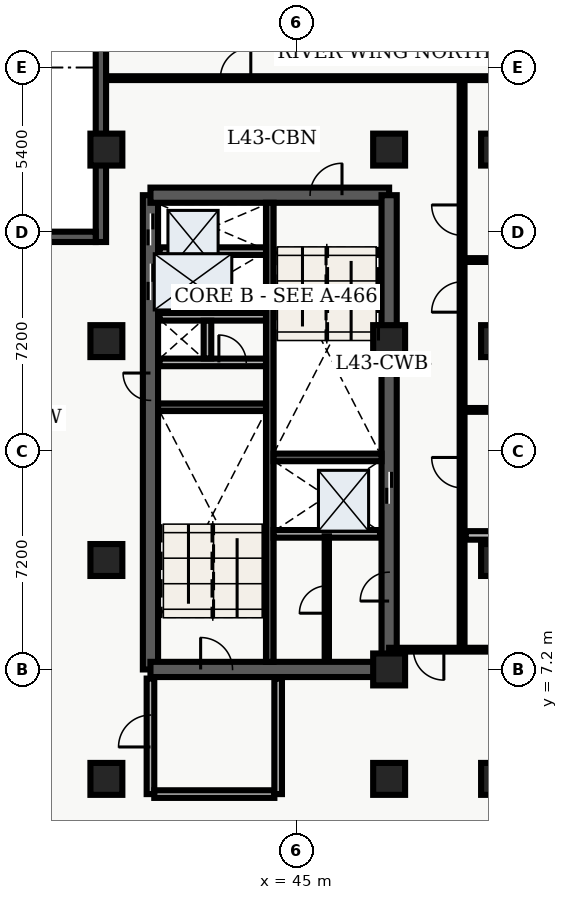
"""IFC4 building model, lengths in metres.
Left out: names, types, materials, properties, quantities, classifications, styles, units other than length and angle.
Written with IfcOpenShell. Run it as: python <this file> out.ifc"""

import sys

from ifc_helpers import new_model, entity, si_unit, converted_unit, direction, frame, origin_with_axes, origin_2d_with_axis, place, context, subcontext, project, spatial, polyline, rectangle, outline, extrude, element, fill, save


model = new_model("IFC4")
c1 = context("Model", 3, precision=1e-05, world=origin_with_axes(), true_north=direction((0.0, 1.0)))
c2 = subcontext(c1, "Body", "Model", "MODEL_VIEW")
j1 = project(units=[si_unit("LENGTHUNIT", "METRE"), converted_unit("PLANEANGLEUNIT", "DEGREE", entity("IfcPlaneAngleMeasure", 0.017), si_unit("PLANEANGLEUNIT", "RADIAN"), dimensions=[0, 0, 0, 0, 0, 0, 0])], contexts=[c1])
p1 = place(None, origin_with_axes())
s1 = spatial("IfcSite", under=j1, at=p1, CompositionType="ELEMENT")
p2 = place(p1, origin_with_axes())
s2 = spatial("IfcBuilding", under=s1, at=p2, CompositionType="ELEMENT")
p3 = place(p2, frame((0.0, 0.0, 175.8), z_axis=(0.0, 0.0, 1.0), x_axis=(1.0, 0.0, 0.0)))
s3 = spatial("IfcBuildingStorey", under=s2, at=p3, CompositionType="ELEMENT", Elevation=175.8)
p4 = place(p3, frame((40.2, 7.2, 0.0), z_axis=(0.0, 0.0, 1.0), x_axis=(0.0, 1.0, 0.0)))
e1 = element("IfcWall", 1, at=p4, inside=s3, PredefinedType="SHEAR", context=c2, shape_type="SweptSolid", body=[
    extrude(outline(polyline([(0.0, -0.25), (15.6, -0.25), (15.6, 0.25), (0.0, 0.25), (0.0, -0.25)])), origin_with_axes(), (0.0, 0.0, 1.0), 3.66),
])
p5 = place(p4, frame((14.475, 0.0, 0.0), z_axis=(0.0, 0.0, 1.0), x_axis=(1.0, 0.0, 0.0)))
e2 = element("IfcOpeningElement", 2, at=p5, cuts=e1, PredefinedType="OPENING", context=c2, shape_type="SweptSolid", body=[
    extrude(rectangle(XDim=1.05, YDim=0.52, at=origin_2d_with_axis()), origin_with_axes(), (0.0, 0.0, 1.0), 2.15),
])
p6 = place(p4, frame((12.75, 0.0, 0.0), z_axis=(0.0, 0.0, 1.0), x_axis=(1.0, 0.0, 0.0)))
e3 = element("IfcOpeningElement", 3, at=p6, cuts=e1, PredefinedType="OPENING", context=c2, shape_type="SweptSolid", body=[
    extrude(rectangle(XDim=1.2, YDim=0.52, at=origin_2d_with_axis()), origin_with_axes(), (0.0, 0.0, 1.0), 2.15),
])
p7 = place(p4, frame((9.3, 0.0, 0.0), z_axis=(0.0, 0.0, 1.0), x_axis=(1.0, 0.0, 0.0)))
e4 = element("IfcOpeningElement", 4, at=p7, cuts=e1, PredefinedType="OPENING", context=c2, shape_type="SweptSolid", body=[
    extrude(rectangle(XDim=0.9, YDim=0.52, at=origin_2d_with_axis()), origin_with_axes(), (0.0, 0.0, 1.0), 2.15),
])
p8 = place(p3, frame((40.2, 7.2, 0.0), z_axis=(0.0, 0.0, 1.0), x_axis=(1.0, 0.0, 0.0)))
e5 = element("IfcWall", 5, at=p8, inside=s3, PredefinedType="SHEAR", context=c2, shape_type="SweptSolid", body=[
    extrude(outline(polyline([(0.0, -0.25), (7.85, -0.25), (7.85, 0.25), (0.0, 0.25), (0.0, -0.25)])), origin_with_axes(), (0.0, 0.0, 1.0), 3.66),
])
p9 = place(p8, frame((2.175, 0.0, 0.0), z_axis=(0.0, 0.0, 1.0), x_axis=(1.0, 0.0, 0.0)))
e6 = element("IfcOpeningElement", 6, at=p9, cuts=e5, PredefinedType="OPENING", context=c2, shape_type="SweptSolid", body=[
    extrude(rectangle(XDim=1.05, YDim=0.52, at=origin_2d_with_axis()), origin_with_axes(), (0.0, 0.0, 1.0), 2.15),
])
p10 = place(p3, frame((40.2, 22.8, 0.0), z_axis=(0.0, 0.0, 1.0), x_axis=(1.0, 0.0, 0.0)))
e7 = element("IfcWall", 7, at=p10, inside=s3, PredefinedType="SHEAR", context=c2, shape_type="SweptSolid", body=[
    extrude(outline(polyline([(0.0, -0.25), (7.85, -0.25), (7.85, 0.25), (0.0, 0.25), (0.0, -0.25)])), origin_with_axes(), (0.0, 0.0, 1.0), 3.66),
])
p11 = place(p10, frame((5.775, 0.0, 0.0), z_axis=(0.0, 0.0, 1.0), x_axis=(1.0, 0.0, 0.0)))
e8 = element("IfcOpeningElement", 8, at=p11, cuts=e7, PredefinedType="OPENING", context=c2, shape_type="SweptSolid", body=[
    extrude(rectangle(XDim=1.05, YDim=0.52, at=origin_2d_with_axis()), origin_with_axes(), (0.0, 0.0, 1.0), 2.15),
])
p12 = place(p3, frame((48.05, 7.2, 0.0), z_axis=(0.0, 0.0, 1.0), x_axis=(0.0, 1.0, 0.0)))
e9 = element("IfcWall", 9, at=p12, inside=s3, PredefinedType="SHEAR", context=c2, shape_type="SweptSolid", body=[
    extrude(outline(polyline([(0.0, -0.25), (15.6, -0.25), (15.6, 0.25), (0.0, 0.25), (0.0, -0.25)])), origin_with_axes(), (0.0, 0.0, 1.0), 3.66),
])
p13 = place(p12, frame((5.975, 0.0, 0.0), z_axis=(0.0, 0.0, 1.0), x_axis=(1.0, 0.0, 0.0)))
e10 = element("IfcOpeningElement", 10, at=p13, cuts=e9, PredefinedType="OPENING", context=c2, shape_type="SweptSolid", body=[
    extrude(rectangle(XDim=1.05, YDim=0.52, at=origin_2d_with_axis()), origin_with_axes(), (0.0, 0.0, 1.0), 2.15),
])
p14 = place(p12, frame((2.725, 0.0, 0.0), z_axis=(0.0, 0.0, 1.0), x_axis=(1.0, 0.0, 0.0)))
e11 = element("IfcOpeningElement", 11, at=p14, cuts=e9, PredefinedType="OPENING", context=c2, shape_type="SweptSolid", body=[
    extrude(rectangle(XDim=0.95, YDim=0.52, at=origin_2d_with_axis()), origin_with_axes(), (0.0, 0.0, 1.0), 2.15),
])
p15 = place(p3, frame((44.125, 7.45, 0.0), z_axis=(0.0, 0.0, 1.0), x_axis=(0.0, 1.0, 0.0)))
e12 = element("IfcWall", 12, at=p15, inside=s3, PredefinedType="SHEAR", context=c2, shape_type="SweptSolid", body=[
    extrude(outline(polyline([(0.0, -0.125), (15.1, -0.125), (15.1, 0.125), (0.0, 0.125), (0.0, -0.125)])), origin_with_axes(), (0.0, 0.0, 1.0), 3.66),
])
for number, where, z_axis, x_axis in (
    (13, (40.45, 15.825, 0.0), (0.0, 0.0, 1.0), (1.0, 0.0, 0.0)),
    (14, (44.25, 14.175, 0.0), (0.0, 0.0, 1.0), (1.0, 0.0, 0.0)),
):
    element("IfcWall", number, at=place(p3, frame(where, z_axis=z_axis, x_axis=x_axis)), inside=s3, PredefinedType="SHEAR", context=c2, shape_type="SweptSolid", body=[
        extrude(outline(polyline([(0.0, -0.125), (3.55, -0.125), (3.55, 0.125), (0.0, 0.125), (0.0, -0.125)])), origin_with_axes(), (0.0, 0.0, 1.0), 3.66),
    ])
p16 = place(p3, frame((40.5, 17.3, 0.0), z_axis=(0.0, 0.0, 1.0), x_axis=(1.0, 0.0, 0.0)))
e15 = element("IfcWall", 15, at=p16, inside=s3, PredefinedType="SOLIDWALL", context=c2, shape_type="SweptSolid", body=[
    extrude(outline(polyline([(0.0, -0.125), (3.5, -0.125), (3.5, 0.125), (0.0, 0.125), (0.0, -0.125)])), origin_with_axes(), (0.0, 0.0, 1.0), 2.7),
])
p17 = place(p16, frame((2.4, 0.0, 0.0), z_axis=(0.0, 0.0, 1.0), x_axis=(1.0, 0.0, 0.0)))
e16 = element("IfcOpeningElement", 16, at=p17, cuts=e15, PredefinedType="OPENING", context=c2, shape_type="SweptSolid", body=[
    extrude(rectangle(XDim=0.9, YDim=0.27, at=origin_2d_with_axis()), origin_with_axes(), (0.0, 0.0, 1.0), 2.15),
])
p18 = place(p3, frame((40.5, 18.8, 0.0), z_axis=(0.0, 0.0, 1.0), x_axis=(1.0, 0.0, 0.0)))
e17 = element("IfcWall", 17, at=p18, inside=s3, PredefinedType="SOLIDWALL", context=c2, shape_type="SweptSolid", body=[
    extrude(outline(polyline([(0.0, -0.125), (3.5, -0.125), (3.5, 0.125), (0.0, 0.125), (0.0, -0.125)])), origin_with_axes(), (0.0, 0.0, 1.0), 2.7),
])
p19 = place(p3, frame((42.075, 17.43, 0.0), z_axis=(0.0, 0.0, 1.0), x_axis=(0.0, 1.0, 0.0)))
e18 = element("IfcWall", 18, at=p19, inside=s3, PredefinedType="SOLIDWALL", context=c2, shape_type="SweptSolid", body=[
    extrude(outline(polyline([(0.0, -0.125), (1.24, -0.125), (1.24, 0.125), (0.0, 0.125), (0.0, -0.125)])), origin_with_axes(), (0.0, 0.0, 1.0), 2.7),
])
p20 = place(p3, frame((40.2, 3.1, 0.0), z_axis=(0.0, 0.0, 1.0), x_axis=(0.0, 1.0, 0.0)))
e19 = element("IfcWall", 19, at=p20, inside=s3, PredefinedType="SOLIDWALL", context=c2, shape_type="SweptSolid", body=[
    extrude(outline(polyline([(0.0, -0.125), (3.8, -0.125), (3.8, 0.125), (0.0, 0.125), (0.0, -0.125)])), origin_with_axes(), (0.0, 0.0, 1.0), 2.7),
])
p21 = place(p20, frame((2.075, 0.0, 0.0), z_axis=(0.0, 0.0, 1.0), x_axis=(1.0, 0.0, 0.0)))
e20 = element("IfcOpeningElement", 20, at=p21, cuts=e19, PredefinedType="OPENING", context=c2, shape_type="SweptSolid", body=[
    extrude(rectangle(XDim=1.05, YDim=0.27, at=origin_2d_with_axis()), origin_with_axes(), (0.0, 0.0, 1.0), 2.15),
])
p22 = place(p3, frame((40.325, 3.1, 0.0), z_axis=(0.0, 0.0, 1.0), x_axis=(1.0, 0.0, 0.0)))
e21 = element("IfcWall", 21, at=p22, inside=s3, PredefinedType="SOLIDWALL", context=c2, shape_type="SweptSolid", body=[
    extrude(outline(polyline([(0.0, -0.125), (3.95, -0.125), (3.95, 0.125), (0.0, 0.125), (0.0, -0.125)])), origin_with_axes(), (0.0, 0.0, 1.0), 2.7),
])
p23 = place(p3, frame((44.4, 3.1, 0.0), z_axis=(0.0, 0.0, 1.0), x_axis=(0.0, 1.0, 0.0)))
e22 = element("IfcWall", 22, at=p23, inside=s3, PredefinedType="SOLIDWALL", context=c2, shape_type="SweptSolid", body=[
    extrude(outline(polyline([(0.0, -0.125), (3.8, -0.125), (3.8, 0.125), (0.0, 0.125), (0.0, -0.125)])), origin_with_axes(), (0.0, 0.0, 1.0), 2.7),
])
for number, where, z_axis, x_axis in (
    (23, (38.75, 3.6, 0.0), (0.0, 0.0, 1.0), (1.0, 0.0, 0.0)),
    (24, (38.75, 10.8, 0.0), (0.0, 0.0, 1.0), (1.0, 0.0, 0.0)),
    (25, (38.75, 18.0, 0.0), (0.0, 0.0, 1.0), (1.0, 0.0, 0.0)),
    (26, (38.75, 24.3, 0.0), (0.0, 0.0, 1.0), (1.0, 0.0, 0.0)),
    (27, (48.05, 3.6, 0.0), (0.0, 0.0, 1.0), (1.0, 0.0, 0.0)),
    (28, (48.05, 7.2, 0.0), (0.0, 0.0, 1.0), (1.0, 0.0, 0.0)),
    (29, (48.05, 18.0, 0.0), (0.0, 0.0, 1.0), (1.0, 0.0, 0.0)),
    (30, (48.05, 24.3, 0.0), (0.0, 0.0, 1.0), (1.0, 0.0, 0.0)),
    (31, (51.6, 3.6, 0.0), (0.0, 0.0, 1.0), (1.0, 0.0, 0.0)),
    (32, (51.6, 10.8, 0.0), (0.0, 0.0, 1.0), (1.0, 0.0, 0.0)),
    (33, (51.6, 18.0, 0.0), (0.0, 0.0, 1.0), (1.0, 0.0, 0.0)),
    (34, (51.6, 24.3, 0.0), (0.0, 0.0, 1.0), (1.0, 0.0, 0.0)),
):
    element("IfcColumn", number, at=place(p3, frame(where, z_axis=z_axis, x_axis=x_axis)), inside=s3, PredefinedType="COLUMN", context=c2, shape_type="SweptSolid", body=[
        extrude(rectangle(XDim=1.05, YDim=1.05, at=origin_2d_with_axis()), origin_with_axes(), (0.0, 0.0, 1.0), 3.9),
    ])
for number, where, z_axis, x_axis in (
    (35, (40.5, 20.96, 0.0), (0.0, 0.0, 1.0), (1.0, 0.0, 0.0)),
    (36, (44.25, 11.66, 0.0), (0.0, 0.0, 1.0), (1.0, 0.0, 0.0)),
):
    element("IfcWall", number, at=place(p3, frame(where, z_axis=z_axis, x_axis=x_axis)), inside=s3, PredefinedType="SOLIDWALL", context=c2, shape_type="SweptSolid", body=[
        extrude(outline(polyline([(0.0, -0.125), (3.5, -0.125), (3.5, 0.125), (0.0, 0.125), (0.0, -0.125)])), origin_with_axes(), (0.0, 0.0, 1.0), 2.7),
    ])
p24 = place(p3, frame((46.0, 7.5, 0.0), z_axis=(0.0, 0.0, 1.0), x_axis=(0.0, 1.0, 0.0)))
e37 = element("IfcWall", 37, at=p24, inside=s3, PredefinedType="PARTITIONING", context=c2, shape_type="SweptSolid", body=[
    extrude(outline(polyline([(0.0, -0.07), (4.08, -0.07), (4.08, 0.07), (0.0, 0.07), (0.0, -0.07)])), origin_with_axes(), (0.0, 0.0, 1.0), 2.7),
])
p25 = place(p24, frame((2.0, 0.0, 0.0), z_axis=(0.0, 0.0, 1.0), x_axis=(1.0, 0.0, 0.0)))
e38 = element("IfcOpeningElement", 38, at=p25, cuts=e37, PredefinedType="OPENING", context=c2, shape_type="SweptSolid", body=[
    extrude(rectangle(XDim=0.9, YDim=0.16, at=origin_2d_with_axis()), origin_with_axes(), (0.0, 0.0, 1.0), 2.15),
])
p26 = place(p3, frame((50.45, 7.85, 0.0), z_axis=(0.0, 0.0, 1.0), x_axis=(0.0, 1.0, 0.0)))
e39 = element("IfcWall", 39, at=p26, inside=s3, PredefinedType="PARTITIONING", context=c2, shape_type="SweptSolid", body=[
    extrude(outline(polyline([(0.0, -0.08), (18.8, -0.08), (18.8, 0.08), (0.0, 0.08), (0.0, -0.08)])), origin_with_axes(), (0.0, 0.0, 1.0), 2.7),
])
p27 = place(p26, frame((5.823, 0.0, 0.0), z_axis=(0.0, 0.0, 1.0), x_axis=(1.0, 0.0, 0.0)))
e40 = element("IfcOpeningElement", 40, at=p27, cuts=e39, PredefinedType="OPENING", context=c2, shape_type="SweptSolid", body=[
    extrude(rectangle(XDim=1.0, YDim=0.18, at=origin_2d_with_axis()), origin_with_axes(), (0.0, 0.0, 1.0), 2.15),
])
p28 = place(p26, frame((11.602, 0.0, 0.0), z_axis=(0.0, 0.0, 1.0), x_axis=(1.0, 0.0, 0.0)))
e41 = element("IfcOpeningElement", 41, at=p28, cuts=e39, PredefinedType="OPENING", context=c2, shape_type="SweptSolid", body=[
    extrude(rectangle(XDim=1.0, YDim=0.18, at=origin_2d_with_axis()), origin_with_axes(), (0.0, 0.0, 1.0), 2.15),
])
p29 = place(p26, frame((14.129, 0.0, 0.0), z_axis=(0.0, 0.0, 1.0), x_axis=(1.0, 0.0, 0.0)))
e42 = element("IfcOpeningElement", 42, at=p29, cuts=e39, PredefinedType="OPENING", context=c2, shape_type="SweptSolid", body=[
    extrude(rectangle(XDim=1.0, YDim=0.18, at=origin_2d_with_axis()), origin_with_axes(), (0.0, 0.0, 1.0), 2.15),
])
p30 = place(p3, frame((59.665, 7.85, 0.0), z_axis=(0.0, 0.0, 1.0), x_axis=(-1.0, 0.0, 0.0)))
e43 = element("IfcWall", 43, at=p30, inside=s3, PredefinedType="PARTITIONING", context=c2, shape_type="SweptSolid", body=[
    extrude(outline(polyline([(0.0, -0.062), (11.615, -0.062), (11.615, 0.062), (0.0, 0.062), (0.0, -0.062)])), origin_with_axes(), (0.0, 0.0, 1.0), 2.7),
])
p31 = place(p30, frame((10.315, 0.0, 0.0), z_axis=(0.0, 0.0, 1.0), x_axis=(1.0, 0.0, 0.0)))
e44 = element("IfcOpeningElement", 44, at=p31, cuts=e43, PredefinedType="OPENING", context=c2, shape_type="SweptSolid", body=[
    extrude(rectangle(XDim=1.0, YDim=0.145, at=origin_2d_with_axis()), origin_with_axes(), (0.0, 0.0, 1.0), 2.15),
])
p32 = place(p3, frame((38.735, 26.65, 0.0), z_axis=(0.0, 0.0, 1.0), x_axis=(1.0, 0.0, 0.0)))
e45 = element("IfcWall", 45, at=p32, inside=s3, PredefinedType="PARTITIONING", context=c2, shape_type="SweptSolid", body=[
    extrude(outline(polyline([(0.0, -0.062), (20.905, -0.062), (20.905, 0.062), (0.0, 0.062), (0.0, -0.062)])), origin_with_axes(), (0.0, 0.0, 1.0), 2.7),
])
p33 = place(p32, frame((4.265, 0.0, 0.0), z_axis=(0.0, 0.0, 1.0), x_axis=(1.0, 0.0, 0.0)))
e46 = element("IfcOpeningElement", 46, at=p33, cuts=e45, PredefinedType="OPENING", context=c2, shape_type="SweptSolid", body=[
    extrude(rectangle(XDim=1.0, YDim=0.145, at=origin_2d_with_axis()), origin_with_axes(), (0.0, 0.0, 1.0), 2.15),
])
p34 = place(p3, frame((50.57, 11.609, 0.0), z_axis=(0.0, 0.0, 1.0), x_axis=(1.0, 0.0, 0.0)))
e47 = element("IfcWall", 47, at=p34, inside=s3, PredefinedType="PARTITIONING", context=c2, shape_type="SweptSolid", body=[
    extrude(outline(polyline([(0.0, -0.14), (9.095, -0.14), (9.095, 0.14), (0.0, 0.14), (0.0, -0.14)])), origin_with_axes(), (0.0, 0.0, 1.0), 2.7),
])
p35 = place(p34, frame((4.525, 0.0, 0.0), z_axis=(0.0, 0.0, 1.0), x_axis=(1.0, 0.0, 0.0)))
e48 = element("IfcOpeningElement", 48, at=p35, cuts=e47, PredefinedType="OPENING", context=c2, shape_type="SweptSolid", body=[
    extrude(rectangle(XDim=0.95, YDim=0.3, at=origin_2d_with_axis()), origin_with_axes(), (0.0, 0.0, 1.0), 2.15),
])
for number, where, z_axis, x_axis in (
    (49, (50.57, 15.737, 0.0), (0.0, 0.0, 1.0), (1.0, 0.0, 0.0)),
    (50, (50.57, 20.667, 0.0), (0.0, 0.0, 1.0), (1.0, 0.0, 0.0)),
):
    element("IfcWall", number, at=place(p3, frame(where, z_axis=z_axis, x_axis=x_axis)), inside=s3, PredefinedType="PARTITIONING", context=c2, shape_type="SweptSolid", body=[
        extrude(outline(polyline([(0.0, -0.062), (9.095, -0.062), (9.095, 0.062), (0.0, 0.062), (0.0, -0.062)])), origin_with_axes(), (0.0, 0.0, 1.0), 2.7),
    ])
p36 = place(p3, frame((38.57, 21.26, 0.0), z_axis=(0.0, 0.0, 1.0), x_axis=(0.0, 1.0, 0.0)))
e51 = element("IfcWall", 51, at=p36, inside=s3, PredefinedType="SOLIDWALL", context=c2, shape_type="SweptSolid", body=[
    extrude(outline(polyline([(0.0, -0.17), (7.54, -0.17), (7.54, 0.17), (0.0, 0.17), (0.0, -0.17)])), origin_with_axes(), (0.0, 0.0, 1.0), 3.66),
])
p37 = place(p3, frame((24.913, 21.43, 0.0), z_axis=(0.0, 0.0, 1.0), x_axis=(1.0, 0.0, 0.0)))
e52 = element("IfcWall", 52, at=p37, inside=s3, PredefinedType="SOLIDWALL", context=c2, shape_type="SweptSolid", body=[
    extrude(outline(polyline([(0.0, -0.17), (13.487, -0.17), (13.487, 0.17), (0.0, 0.17), (0.0, -0.17)])), origin_with_axes(), (0.0, 0.0, 1.0), 3.66),
])
p38 = place(p37, frame((3.672, 0.0, 0.45), z_axis=(0.0, 0.0, 1.0), x_axis=(1.0, 0.0, 0.0)))
e53 = element("IfcOpeningElement", 53, at=p38, cuts=e52, PredefinedType="OPENING", context=c2, shape_type="SweptSolid", body=[
    extrude(rectangle(XDim=1.8, YDim=0.36, at=origin_2d_with_axis()), origin_with_axes(), (0.0, 0.0, 1.0), 2.1),
])
p39 = place(p37, frame((9.815, 0.0, 0.45), z_axis=(0.0, 0.0, 1.0), x_axis=(1.0, 0.0, 0.0)))
e54 = element("IfcOpeningElement", 54, at=p39, cuts=e52, PredefinedType="OPENING", context=c2, shape_type="SweptSolid", body=[
    extrude(rectangle(XDim=1.8, YDim=0.36, at=origin_2d_with_axis()), origin_with_axes(), (0.0, 0.0, 1.0), 2.1),
])
p40 = place(p12, frame((5.975, 0.0, 0.0), z_axis=(0.0, 0.0, 1.0), x_axis=(1.0, 0.0, 0.0)))
e55 = element("IfcDoor", 55, at=p40, inside=s3, OperationType="SLIDING_TO_LEFT", PredefinedType="DOOR", context=c2, shape_type="SweptSolid", body=[
    extrude(rectangle(XDim=1.05, YDim=0.09, at=origin_2d_with_axis()), origin_with_axes(), (0.0, 0.0, 1.0), 2.15),
])
fill(e10, e55)
p41 = place(p4, frame((14.475, 0.0, 0.0), z_axis=(0.0, 0.0, 1.0), x_axis=(1.0, 0.0, 0.0)))
e56 = element("IfcDoor", 56, at=p41, inside=s3, OperationType="SLIDING_TO_RIGHT", PredefinedType="DOOR", context=c2, shape_type="SweptSolid", body=[
    extrude(rectangle(XDim=1.05, YDim=0.09, at=origin_2d_with_axis()), origin_with_axes(), (0.0, 0.0, 1.0), 2.15),
])
fill(e2, e56)
p42 = place(p4, frame((12.75, 0.0, 0.0), z_axis=(0.0, 0.0, 1.0), x_axis=(1.0, 0.0, 0.0)))
e57 = element("IfcDoor", 57, at=p42, inside=s3, OperationType="DOUBLE_DOOR_SLIDING", PredefinedType="DOOR", context=c2, shape_type="SweptSolid", body=[
    extrude(rectangle(XDim=1.2, YDim=0.09, at=origin_2d_with_axis()), origin_with_axes(), (0.0, 0.0, 1.0), 2.15),
])
fill(e3, e57)
p43 = place(p4, frame((9.3, 0.0, 0.0), z_axis=(0.0, 0.0, 1.0), x_axis=(1.0, 0.0, 0.0)))
e58 = element("IfcDoor", 58, at=p43, inside=s3, OperationType="SINGLE_SWING_RIGHT", PredefinedType="DOOR", context=c2, shape_type="SweptSolid", body=[
    extrude(rectangle(XDim=0.9, YDim=0.09, at=origin_2d_with_axis()), origin_with_axes(), (0.0, 0.0, 1.0), 2.15),
])
fill(e4, e58)
p44 = place(p16, frame((2.4, 0.0, 0.0), z_axis=(0.0, 0.0, 1.0), x_axis=(1.0, 0.0, 0.0)))
e59 = element("IfcDoor", 59, at=p44, inside=s3, OperationType="SINGLE_SWING_LEFT", PredefinedType="DOOR", context=c2, shape_type="SweptSolid", body=[
    extrude(rectangle(XDim=0.9, YDim=0.09, at=origin_2d_with_axis()), origin_with_axes(), (0.0, 0.0, 1.0), 2.15),
])
fill(e16, e59)
p45 = place(p8, frame((2.175, 0.0, 0.0), z_axis=(0.0, 0.0, 1.0), x_axis=(1.0, 0.0, 0.0)))
e60 = element("IfcDoor", 60, at=p45, inside=s3, OperationType="SINGLE_SWING_LEFT", PredefinedType="DOOR", context=c2, shape_type="SweptSolid", body=[
    extrude(rectangle(XDim=1.05, YDim=0.09, at=origin_2d_with_axis()), origin_with_axes(), (0.0, 0.0, 1.0), 2.15),
])
fill(e6, e60)
p46 = place(p10, frame((5.775, 0.0, 0.0), z_axis=(0.0, 0.0, 1.0), x_axis=(1.0, 0.0, 0.0)))
e61 = element("IfcDoor", 61, at=p46, inside=s3, OperationType="SINGLE_SWING_RIGHT", PredefinedType="DOOR", context=c2, shape_type="SweptSolid", body=[
    extrude(rectangle(XDim=1.05, YDim=0.09, at=origin_2d_with_axis()), origin_with_axes(), (0.0, 0.0, 1.0), 2.15),
])
fill(e8, e61)
p47 = place(p20, frame((2.075, 0.0, 0.0), z_axis=(0.0, 0.0, 1.0), x_axis=(1.0, 0.0, 0.0)))
e62 = element("IfcDoor", 62, at=p47, inside=s3, OperationType="SINGLE_SWING_LEFT", PredefinedType="DOOR", context=c2, shape_type="SweptSolid", body=[
    extrude(rectangle(XDim=1.05, YDim=0.09, at=origin_2d_with_axis()), origin_with_axes(), (0.0, 0.0, 1.0), 2.15),
])
fill(e20, e62)
p48 = place(p24, frame((2.0, 0.0, 0.0), z_axis=(0.0, 0.0, 1.0), x_axis=(1.0, 0.0, 0.0)))
e63 = element("IfcDoor", 63, at=p48, inside=s3, OperationType="SINGLE_SWING_LEFT", PredefinedType="DOOR", context=c2, shape_type="SweptSolid", body=[
    extrude(rectangle(XDim=0.9, YDim=0.084, at=origin_2d_with_axis()), origin_with_axes(), (0.0, 0.0, 1.0), 2.15),
])
fill(e38, e63)
p49 = place(p12, frame((2.725, 0.0, 0.0), z_axis=(0.0, 0.0, 1.0), x_axis=(1.0, 0.0, 0.0)))
e64 = element("IfcDoor", 64, at=p49, inside=s3, OperationType="SINGLE_SWING_LEFT", PredefinedType="DOOR", context=c2, shape_type="SweptSolid", body=[
    extrude(rectangle(XDim=0.95, YDim=0.09, at=origin_2d_with_axis()), origin_with_axes(), (0.0, 0.0, 1.0), 2.15),
])
fill(e11, e64)
p50 = place(p30, frame((10.315, 0.0, 0.0), z_axis=(0.0, 0.0, 1.0), x_axis=(1.0, 0.0, 0.0)))
e65 = element("IfcDoor", 65, at=p50, inside=s3, OperationType="SINGLE_SWING_LEFT", PredefinedType="DOOR", context=c2, shape_type="SweptSolid", body=[
    extrude(rectangle(XDim=1.0, YDim=0.075, at=origin_2d_with_axis()), origin_with_axes(), (0.0, 0.0, 1.0), 2.15),
])
fill(e44, e65)
p51 = place(p32, frame((4.265, 0.0, 0.0), z_axis=(0.0, 0.0, 1.0), x_axis=(1.0, 0.0, 0.0)))
e66 = element("IfcDoor", 66, at=p51, inside=s3, OperationType="SINGLE_SWING_RIGHT", PredefinedType="DOOR", context=c2, shape_type="SweptSolid", body=[
    extrude(rectangle(XDim=1.0, YDim=0.075, at=origin_2d_with_axis()), origin_with_axes(), (0.0, 0.0, 1.0), 2.15),
])
fill(e46, e66)
p52 = place(p26, frame((5.823, 0.0, 0.0), z_axis=(0.0, 0.0, 1.0), x_axis=(1.0, 0.0, 0.0)))
e67 = element("IfcDoor", 67, at=p52, inside=s3, OperationType="SINGLE_SWING_RIGHT", PredefinedType="DOOR", context=c2, shape_type="SweptSolid", body=[
    extrude(rectangle(XDim=1.0, YDim=0.09, at=origin_2d_with_axis()), origin_with_axes(), (0.0, 0.0, 1.0), 2.15),
])
fill(e40, e67)
p53 = place(p26, frame((11.602, 0.0, 0.0), z_axis=(0.0, 0.0, 1.0), x_axis=(1.0, 0.0, 0.0)))
e68 = element("IfcDoor", 68, at=p53, inside=s3, OperationType="SINGLE_SWING_LEFT", PredefinedType="DOOR", context=c2, shape_type="SweptSolid", body=[
    extrude(rectangle(XDim=1.0, YDim=0.09, at=origin_2d_with_axis()), origin_with_axes(), (0.0, 0.0, 1.0), 2.15),
])
fill(e41, e68)
p54 = place(p26, frame((14.129, 0.0, 0.0), z_axis=(0.0, 0.0, 1.0), x_axis=(1.0, 0.0, 0.0)))
e69 = element("IfcDoor", 69, at=p54, inside=s3, OperationType="SINGLE_SWING_RIGHT", PredefinedType="DOOR", context=c2, shape_type="SweptSolid", body=[
    extrude(rectangle(XDim=1.0, YDim=0.09, at=origin_2d_with_axis()), origin_with_axes(), (0.0, 0.0, 1.0), 2.15),
])
fill(e42, e69)
save(model, sys.argv[1])
